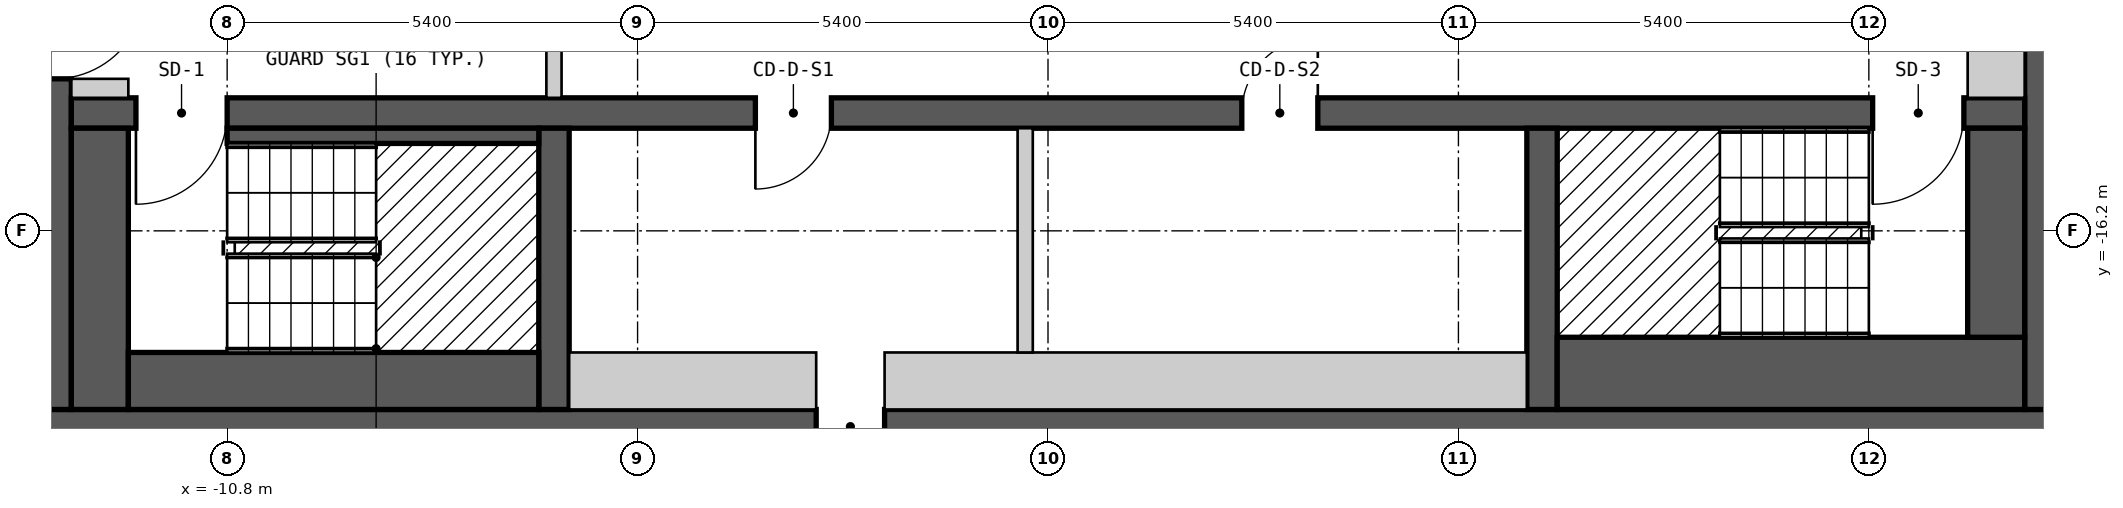
"""IFC4 building model, lengths in metres.
Left out: names, types, materials, properties, quantities, classifications, styles, units other than length and angle.
Written with IfcOpenShell. Run it as: python <this file> out.ifc"""

import sys

from ifc_helpers import new_model, si_unit, direction, frame, frame_2d, origin, place, context, subcontext, project, spatial, polyline, rectangle, outline, extrude, element, fill, save


model = new_model("IFC4")
c1 = context("Model", 3, precision=1e-05, world=origin(), true_north=direction((0.0, 1.0)))
c2 = subcontext(c1, "Body", "Model", "MODEL_VIEW")
j1 = project(units=[si_unit("LENGTHUNIT", "METRE"), si_unit("PLANEANGLEUNIT", "RADIAN")], contexts=[c1])
p1 = place(None, origin())
s1 = spatial("IfcSite", under=j1, at=p1, CompositionType="ELEMENT")
p2 = place(p1, origin())
s2 = spatial("IfcBuilding", under=s1, at=p2, CompositionType="ELEMENT")
p3 = place(p2, frame((0.0, 0.0, 208.8)))
s3 = spatial("IfcBuildingStorey", under=s2, at=p3, CompositionType="ELEMENT", Elevation=208.8)
p4 = place(p3, frame((-13.3, -18.775, 0.0), z_axis=(0.0, 0.0, 1.0), x_axis=(1.0, 0.0, 0.0)))
e1 = element("IfcWall", 1, at=p4, inside=s3, PredefinedType="SHEAR", context=c2, shape_type="SweptSolid", body=[
    extrude(rectangle(XDim=26.6, YDim=0.45, at=frame_2d((13.3, 0.0))), origin(), (0.0, 0.0, 1.0), 2.7),
])
p5 = place(p4, frame((10.25, 0.0, 0.0)))
e2 = element("IfcOpeningElement", 2, at=p5, cuts=e1, PredefinedType="OPENING", context=c2, shape_type="SweptSolid", body=[
    extrude(rectangle(XDim=0.9, YDim=2.1, at=frame_2d((0.45, 1.05))), frame((0.0, 0.235, 0.0), z_axis=(0.0, -1.0, 0.0), x_axis=(1.0, 0.0, 0.0)), (0.0, 0.0, 1.0), 0.47),
])
p6 = place(p3, frame((-13.075, -18.55, 0.0), z_axis=(0.0, 0.0, 1.0), x_axis=(0.0, 1.0, 0.0)))
e3 = element("IfcWall", 3, at=p6, inside=s3, PredefinedType="SHEAR", context=c2, shape_type="SweptSolid", body=[
    extrude(rectangle(XDim=13.1, YDim=0.45, at=frame_2d((6.55, 0.0))), origin(), (0.0, 0.0, 1.0), 2.7),
])
p7 = place(p6, frame((4.35, 0.0, 0.0)))
e4 = element("IfcOpeningElement", 4, at=p7, cuts=e3, PredefinedType="OPENING", context=c2, shape_type="SweptSolid", body=[
    extrude(rectangle(XDim=1.2, YDim=2.1, at=frame_2d((0.6, 1.05))), frame((0.0, 0.235, 0.0), z_axis=(0.0, -1.0, 0.0), x_axis=(1.0, 0.0, 0.0)), (0.0, 0.0, 1.0), 0.47),
])
p8 = place(p3, frame((13.075, -18.55, 0.0), z_axis=(0.0, 0.0, 1.0), x_axis=(0.0, 1.0, 0.0)))
e5 = element("IfcWall", 5, at=p8, inside=s3, PredefinedType="SHEAR", context=c2, shape_type="SweptSolid", body=[
    extrude(rectangle(XDim=13.1, YDim=0.45, at=frame_2d((6.55, 0.0))), origin(), (0.0, 0.0, 1.0), 2.7),
])
p9 = place(p3, frame((-12.85, -14.65, 0.0), z_axis=(0.0, 0.0, 1.0), x_axis=(1.0, 0.0, 0.0)))
e6 = element("IfcWall", 6, at=p9, inside=s3, PredefinedType="SHEAR", context=c2, shape_type="SweptSolid", body=[
    extrude(rectangle(XDim=25.7, YDim=0.4, at=frame_2d((12.85, 0.0))), origin(), (0.0, 0.0, 1.0), 2.7),
])
p10 = place(p9, frame((2.05, 0.0, 0.0), z_axis=(0.0, 0.0, 1.0), x_axis=(-1.0, 0.0, 0.0)))
e7 = element("IfcOpeningElement", 7, at=p10, cuts=e6, PredefinedType="OPENING", context=c2, shape_type="SweptSolid", body=[
    extrude(rectangle(XDim=1.2, YDim=2.1, at=frame_2d((0.6, 1.05))), frame((0.0, 0.21, 0.0), z_axis=(0.0, -1.0, 0.0), x_axis=(1.0, 0.0, 0.0)), (0.0, 0.0, 1.0), 0.42),
])
p11 = place(p9, frame((24.9, 0.0, 0.0), z_axis=(0.0, 0.0, 1.0), x_axis=(-1.0, 0.0, 0.0)))
e8 = element("IfcOpeningElement", 8, at=p11, cuts=e6, PredefinedType="OPENING", context=c2, shape_type="SweptSolid", body=[
    extrude(rectangle(XDim=1.2, YDim=2.1, at=frame_2d((0.6, 1.05))), frame((0.0, 0.21, 0.0), z_axis=(0.0, -1.0, 0.0), x_axis=(1.0, 0.0, 0.0)), (0.0, 0.0, 1.0), 0.42),
])
p12 = place(p9, frame((10.0, 0.0, 0.0), z_axis=(0.0, 0.0, 1.0), x_axis=(-1.0, 0.0, 0.0)))
e9 = element("IfcOpeningElement", 9, at=p12, cuts=e6, PredefinedType="OPENING", context=c2, shape_type="SweptSolid", body=[
    extrude(rectangle(XDim=1.0, YDim=2.1, at=frame_2d((0.5, 1.05))), frame((0.0, 0.21, 0.0), z_axis=(0.0, -1.0, 0.0), x_axis=(1.0, 0.0, 0.0)), (0.0, 0.0, 1.0), 0.42),
])
p13 = place(p9, frame((16.4, 0.0, 0.0), z_axis=(0.0, 0.0, 1.0), x_axis=(-1.0, 0.0, 0.0)))
e10 = element("IfcOpeningElement", 10, at=p13, cuts=e6, PredefinedType="OPENING", context=c2, shape_type="SweptSolid", body=[
    extrude(rectangle(XDim=1.0, YDim=2.1, at=frame_2d((0.5, 1.05))), frame((0.0, 0.21, 0.0), z_axis=(0.0, -1.0, 0.0), x_axis=(1.0, 0.0, 0.0)), (0.0, 0.0, 1.0), 0.42),
])
for number, where, z_axis, x_axis in (
    (11, (-6.5, -18.55, 0.0), (0.0, 0.0, 1.0), (0.0, 1.0, 0.0)),
    (12, (6.5, -18.55, 0.0), (0.0, 0.0, 1.0), (0.0, 1.0, 0.0)),
):
    element("IfcWall", number, at=place(p3, frame(where, z_axis=z_axis, x_axis=x_axis)), inside=s3, PredefinedType="SHEAR", context=c2, shape_type="SweptSolid", body=[
        extrude(rectangle(XDim=3.7, YDim=0.4, at=frame_2d((1.85, 0.0))), origin(), (0.0, 0.0, 1.0), 2.7),
    ])
p14 = place(p3, frame((-15.34, -18.37, 0.0), z_axis=(0.0, 0.0, 1.0), x_axis=(0.866022959057, -0.500004234368, 0.0)))
e13 = element("IfcWall", 13, at=p14, inside=s3, PredefinedType="SOLIDWALL", context=c2, shape_type="SweptSolid", body=[
    extrude(outline(polyline([(0.0, -0.15), (5.0, -0.15), (4.92, 0.15), (0.08, 0.15), (0.0, -0.15)])), origin(), (0.0, 0.0, 1.0), 2.7),
])
p15 = place(p14, frame((0.65, 0.0, 0.15)))
e14 = element("IfcOpeningElement", 14, at=p15, cuts=e13, PredefinedType="OPENING", context=c2, shape_type="SweptSolid", body=[
    extrude(rectangle(XDim=1.2, YDim=2.1, at=frame_2d((0.6, 1.05))), frame((0.0, 0.16, 0.0), z_axis=(0.0, -1.0, 0.0), x_axis=(1.0, 0.0, 0.0)), (0.0, 0.0, 1.0), 0.32),
])
p16 = place(p14, frame((3.15, 0.0, 0.15)))
e15 = element("IfcOpeningElement", 15, at=p16, cuts=e13, PredefinedType="OPENING", context=c2, shape_type="SweptSolid", body=[
    extrude(rectangle(XDim=1.2, YDim=2.1, at=frame_2d((0.6, 1.05))), frame((0.0, 0.16, 0.0), z_axis=(0.0, -1.0, 0.0), x_axis=(1.0, 0.0, 0.0)), (0.0, 0.0, 1.0), 0.32),
])
p17 = place(p3, frame((11.01, -20.87, 0.0), z_axis=(0.0, 0.0, 1.0), x_axis=(0.866022959057, 0.500004234368, 0.0)))
e16 = element("IfcWall", 16, at=p17, inside=s3, PredefinedType="SOLIDWALL", context=c2, shape_type="SweptSolid", body=[
    extrude(outline(polyline([(0.0, -0.15), (5.0, -0.15), (4.92, 0.15), (0.08, 0.15), (0.0, -0.15)])), origin(), (0.0, 0.0, 1.0), 2.7),
])
p18 = place(p17, frame((0.65, 0.0, 0.15)))
e17 = element("IfcOpeningElement", 17, at=p18, cuts=e16, PredefinedType="OPENING", context=c2, shape_type="SweptSolid", body=[
    extrude(rectangle(XDim=1.2, YDim=2.1, at=frame_2d((0.6, 1.05))), frame((0.0, 0.16, 0.0), z_axis=(0.0, -1.0, 0.0), x_axis=(1.0, 0.0, 0.0)), (0.0, 0.0, 1.0), 0.32),
])
p19 = place(p17, frame((3.149, 0.0, 0.15)))
e18 = element("IfcOpeningElement", 18, at=p19, cuts=e16, PredefinedType="OPENING", context=c2, shape_type="SweptSolid", body=[
    extrude(rectangle(XDim=1.2, YDim=2.1, at=frame_2d((0.6, 1.05))), frame((0.0, 0.16, 0.0), z_axis=(0.0, -1.0, 0.0), x_axis=(1.0, 0.0, 0.0)), (0.0, 0.0, 1.0), 0.32),
])
p20 = place(p3, frame((-12.475, -18.55, 0.0), z_axis=(0.0, 0.0, 1.0), x_axis=(0.0, 1.0, 0.0)))
e19 = element("IfcWall", 19, at=p20, inside=s3, PredefinedType="SOLIDWALL", context=c2, shape_type="SweptSolid", body=[
    extrude(rectangle(XDim=3.7, YDim=0.75, at=frame_2d((1.85, 0.0))), origin(), (0.0, 0.0, 1.0), 2.7),
])
p21 = place(p3, frame((-12.85, -14.325, 0.0), z_axis=(0.0, 0.0, 1.0), x_axis=(1.0, 0.0, 0.0)))
e20 = element("IfcWall", 20, at=p21, inside=s3, PredefinedType="PARTITIONING", context=c2, shape_type="SweptSolid", body=[
    extrude(rectangle(XDim=0.75, YDim=0.25, at=frame_2d((0.375, 0.0))), origin(), (0.0, 0.0, 1.0), 2.7),
])
p22 = place(p3, frame((-12.1, -18.175, 0.0), z_axis=(0.0, 0.0, 1.0), x_axis=(1.0, 0.0, 0.0)))
e21 = element("IfcWall", 21, at=p22, inside=s3, PredefinedType="SOLIDWALL", context=c2, shape_type="SweptSolid", body=[
    extrude(rectangle(XDim=5.4, YDim=0.75, at=frame_2d((2.7, 0.0))), origin(), (0.0, 0.0, 1.0), 2.7),
])
p23 = place(p3, frame((-10.8, -14.95, 0.0), z_axis=(0.0, 0.0, 1.0), x_axis=(1.0, 0.0, 0.0)))
e22 = element("IfcWall", 22, at=p23, inside=s3, PredefinedType="SOLIDWALL", context=c2, shape_type="SweptSolid", body=[
    extrude(rectangle(XDim=4.1, YDim=0.2, at=frame_2d((2.05, 0.0))), origin(), (0.0, 0.0, 1.0), 2.7),
])
p24 = place(p3, frame((-6.5, -14.45, 0.0), z_axis=(0.0, 0.0, 1.0), x_axis=(0.0, 1.0, 0.0)))
e23 = element("IfcWall", 23, at=p24, inside=s3, PredefinedType="PARTITIONING", context=c2, shape_type="SweptSolid", body=[
    extrude(rectangle(XDim=4.9, YDim=0.2, at=frame_2d((2.45, 0.0))), origin(), (0.0, 0.0, 1.0), 2.7),
])
p25 = place(p24, frame((3.15, 0.0, 0.0), z_axis=(0.0, 0.0, 1.0), x_axis=(-1.0, 0.0, 0.0)))
e24 = element("IfcOpeningElement", 24, at=p25, cuts=e23, PredefinedType="OPENING", context=c2, shape_type="SweptSolid", body=[
    extrude(rectangle(XDim=1.4, YDim=2.1, at=frame_2d((0.7, 1.05))), frame((0.0, 0.11, 0.0), z_axis=(0.0, -1.0, 0.0), x_axis=(1.0, 0.0, 0.0)), (0.0, 0.0, 1.0), 0.22),
])
p26 = place(p3, frame((-6.3, -18.175, 0.0), z_axis=(0.0, 0.0, 1.0), x_axis=(1.0, 0.0, 0.0)))
e25 = element("IfcWall", 25, at=p26, inside=s3, PredefinedType="PARTITIONING", context=c2, shape_type="SweptSolid", body=[
    extrude(rectangle(XDim=3.25, YDim=0.75, at=frame_2d((1.625, 0.0))), origin(), (0.0, 0.0, 1.0), 2.7),
])
p27 = place(p3, frame((-2.15, -18.175, 0.0), z_axis=(0.0, 0.0, 1.0), x_axis=(1.0, 0.0, 0.0)))
e26 = element("IfcWall", 26, at=p27, inside=s3, PredefinedType="PARTITIONING", context=c2, shape_type="SweptSolid", body=[
    extrude(rectangle(XDim=8.45, YDim=0.75, at=frame_2d((4.225, 0.0))), origin(), (0.0, 0.0, 1.0), 2.7),
])
p28 = place(p3, frame((-0.3, -17.8, 0.0), z_axis=(0.0, 0.0, 1.0), x_axis=(0.0, 1.0, 0.0)))
e27 = element("IfcWall", 27, at=p28, inside=s3, PredefinedType="PARTITIONING", context=c2, shape_type="SweptSolid", body=[
    extrude(rectangle(XDim=2.95, YDim=0.2, at=frame_2d((1.475, 0.0))), origin(), (0.0, 0.0, 1.0), 2.7),
])
p29 = place(p3, frame((6.7, -18.075, 0.0), z_axis=(0.0, 0.0, 1.0), x_axis=(1.0, 0.0, 0.0)))
e28 = element("IfcWall", 28, at=p29, inside=s3, PredefinedType="SOLIDWALL", context=c2, shape_type="SweptSolid", body=[
    extrude(rectangle(XDim=6.15, YDim=0.95, at=frame_2d((3.075, 0.0))), origin(), (0.0, 0.0, 1.0), 2.7),
])
p30 = place(p3, frame((12.475, -17.6, 0.0), z_axis=(0.0, 0.0, 1.0), x_axis=(0.0, 1.0, 0.0)))
e29 = element("IfcWall", 29, at=p30, inside=s3, PredefinedType="SOLIDWALL", context=c2, shape_type="SweptSolid", body=[
    extrude(rectangle(XDim=2.75, YDim=0.75, at=frame_2d((1.375, 0.0))), origin(), (0.0, 0.0, 1.0), 2.7),
])
p31 = place(p3, frame((12.475, -14.45, 0.0), z_axis=(0.0, 0.0, 1.0), x_axis=(0.0, 1.0, 0.0)))
e30 = element("IfcWall", 30, at=p31, inside=s3, PredefinedType="PARTITIONING", context=c2, shape_type="SweptSolid", body=[
    extrude(rectangle(XDim=8.25, YDim=0.75, at=frame_2d((4.125, 0.0))), origin(), (0.0, 0.0, 1.0), 2.7),
])
p32 = place(p10, origin())
e31 = element("IfcDoor", 31, at=p32, inside=s3, OperationType="SINGLE_SWING_RIGHT", PredefinedType="DOOR", context=c2, shape_type="SweptSolid", body=[
    extrude(rectangle(XDim=1.2, YDim=2.1, at=frame_2d((0.6, 1.05))), frame((0.0, 0.025, 0.0), z_axis=(0.0, -1.0, 0.0), x_axis=(1.0, 0.0, 0.0)), (0.0, 0.0, 1.0), 0.05),
])
fill(e7, e31)
p33 = place(p11, origin())
e32 = element("IfcDoor", 32, at=p33, inside=s3, OperationType="SINGLE_SWING_RIGHT", PredefinedType="DOOR", context=c2, shape_type="SweptSolid", body=[
    extrude(rectangle(XDim=1.2, YDim=2.1, at=frame_2d((0.6, 1.05))), frame((0.0, 0.025, 0.0), z_axis=(0.0, -1.0, 0.0), x_axis=(1.0, 0.0, 0.0)), (0.0, 0.0, 1.0), 0.05),
])
fill(e8, e32)
p34 = place(p7, origin())
e33 = element("IfcDoor", 33, at=p34, inside=s3, OperationType="SINGLE_SWING_RIGHT", PredefinedType="DOOR", context=c2, shape_type="SweptSolid", body=[
    extrude(rectangle(XDim=1.2, YDim=2.1, at=frame_2d((0.6, 1.05))), frame((0.0, 0.025, 0.0), z_axis=(0.0, -1.0, 0.0), x_axis=(1.0, 0.0, 0.0)), (0.0, 0.0, 1.0), 0.05),
])
fill(e4, e33)
p35 = place(p12, origin())
e34 = element("IfcDoor", 34, at=p35, inside=s3, OperationType="SINGLE_SWING_RIGHT", PredefinedType="DOOR", context=c2, shape_type="SweptSolid", body=[
    extrude(rectangle(XDim=1.0, YDim=2.1, at=frame_2d((0.5, 1.05))), frame((0.0, 0.025, 0.0), z_axis=(0.0, -1.0, 0.0), x_axis=(1.0, 0.0, 0.0)), (0.0, 0.0, 1.0), 0.05),
])
fill(e9, e34)
p36 = place(p13, origin())
e35 = element("IfcDoor", 35, at=p36, inside=s3, OperationType="SINGLE_SWING_LEFT", PredefinedType="DOOR", context=c2, shape_type="SweptSolid", body=[
    extrude(rectangle(XDim=1.0, YDim=2.1, at=frame_2d((0.5, 1.05))), frame((0.0, 0.025, 0.0), z_axis=(0.0, -1.0, 0.0), x_axis=(1.0, 0.0, 0.0)), (0.0, 0.0, 1.0), 0.05),
])
fill(e10, e35)
p37 = place(p5, origin())
e36 = element("IfcDoor", 36, at=p37, inside=s3, OperationType="SINGLE_SWING_RIGHT", PredefinedType="DOOR", context=c2, shape_type="SweptSolid", body=[
    extrude(rectangle(XDim=0.9, YDim=2.1, at=frame_2d((0.45, 1.05))), frame((0.0, 0.025, 0.0), z_axis=(0.0, -1.0, 0.0), x_axis=(1.0, 0.0, 0.0)), (0.0, 0.0, 1.0), 0.05),
])
fill(e2, e36)
save(model, sys.argv[1])
